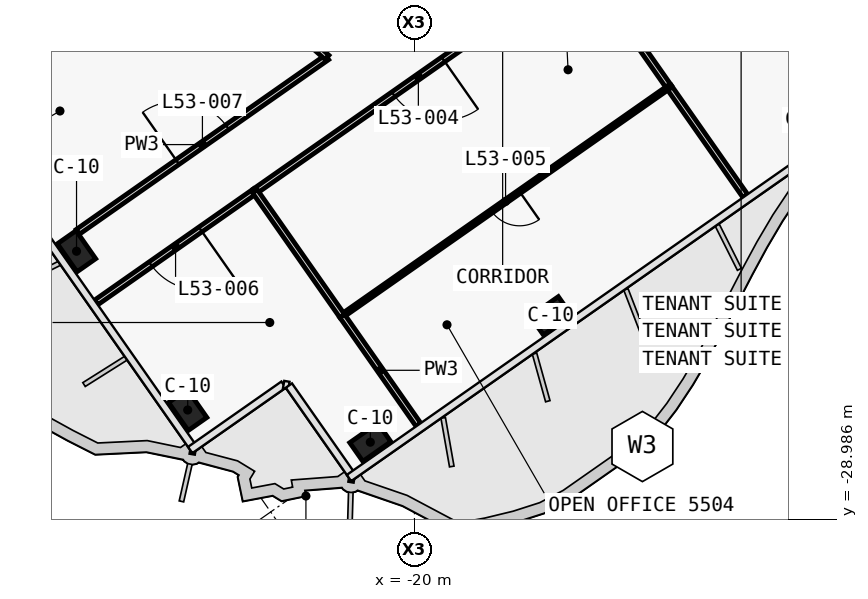
"""IFC4 building model, lengths in metres.
Left out: names, types, materials, properties, quantities, classifications, styles, units other than length and angle.
Written with IfcOpenShell. Run it as: python <this file> out.ifc"""

import sys

from ifc_helpers import new_model, si_unit, direction, frame, frame_2d, origin, origin_2d, place, context, subcontext, project, spatial, rectangle, extrude, element, fill, save


model = new_model("IFC4")
c1 = context("Model", 3, precision=1e-05, world=origin(), true_north=direction((0.0, 1.0)))
c2 = subcontext(c1, "Body", "Model", "MODEL_VIEW")
j1 = project(units=[si_unit("LENGTHUNIT", "METRE"), si_unit("PLANEANGLEUNIT", "RADIAN")], contexts=[c1])
p1 = place(None, origin())
s1 = spatial("IfcSite", under=j1, at=p1, CompositionType="ELEMENT")
p2 = place(p1, origin())
s2 = spatial("IfcBuilding", under=s1, at=p2, CompositionType="ELEMENT")
p3 = place(p2, frame((0.0, 0.0, 229.3)))
s3 = spatial("IfcBuildingStorey", under=s2, at=p3, CompositionType="ELEMENT", Elevation=229.3)
for number, where, z_axis, x_axis in (
    (1, (-16.41, -23.637, 0.0), (0.0, 0.0, 1.0), (-0.819, -0.574, 0.0)),
    (2, (-21.161, -26.964, 0.0), (0.0, 0.0, 1.0), (-0.819, -0.574, 0.0)),
    (3, (-25.966, -26.117, 0.0), (0.0, 0.0, 1.0), (-0.574, 0.819, 0.0)),
    (4, (-28.891, -21.939, 0.0), (0.0, 0.0, 1.0), (-0.574, 0.819, 0.0)),
):
    element("IfcColumn", number, at=place(p3, frame(where, z_axis=z_axis, x_axis=x_axis)), inside=s3, PredefinedType="COLUMN", context=c2, shape_type="SweptSolid", body=[
        extrude(rectangle(XDim=0.9, YDim=0.6, at=origin_2d()), origin(), (0.0, 0.0, 1.0), 3.9),
    ])
p4 = place(p3, frame((-28.858, -21.428, 0.0), z_axis=(0.0, 0.0, 1.0), x_axis=(0.819138799838, 0.573595350923, 0.0)))
e5 = element("IfcWall", 5, at=p4, inside=s3, PredefinedType="PARTITIONING", context=c2, shape_type="SweptSolid", body=[
    extrude(rectangle(XDim=8.007, YDim=0.15, at=frame_2d((4.003, 0.0))), origin(), (0.0, 0.0, 1.0), 3.05),
])
p5 = place(p4, frame((3.204, 0.0, 0.0)))
e6 = element("IfcOpeningElement", 6, at=p5, cuts=e5, PredefinedType="OPENING", context=c2, shape_type="SweptSolid", body=[
    extrude(rectangle(XDim=1.6, YDim=2.1, at=frame_2d((0.8, 1.05))), frame((0.0, 0.085, 0.0), z_axis=(0.0, -1.0, 0.0), x_axis=(1.0, 0.0, 0.0)), (0.0, 0.0, 1.0), 0.17),
])
p6 = place(p3, frame((-15.594, -14.338, 0.0), z_axis=(0.0, 0.0, 1.0), x_axis=(-0.819164214721, -0.57355905478, 0.0)))
e7 = element("IfcWall", 7, at=p6, inside=s3, PredefinedType="PARTITIONING", context=c2, shape_type="SweptSolid", body=[
    extrude(rectangle(XDim=10.504, YDim=0.15, at=frame_2d((5.252, 0.0))), origin(), (0.0, 0.0, 1.0), 3.05),
])
p7 = place(p6, frame((4.452, 0.0, 0.0)))
e8 = element("IfcOpeningElement", 8, at=p7, cuts=e7, PredefinedType="OPENING", context=c2, shape_type="SweptSolid", body=[
    extrude(rectangle(XDim=1.6, YDim=2.1, at=frame_2d((0.8, 1.05))), frame((0.0, 0.085, 0.0), z_axis=(0.0, -1.0, 0.0), x_axis=(1.0, 0.0, 0.0)), (0.0, 0.0, 1.0), 0.17),
])
p8 = place(p3, frame((-24.196, -20.36, 0.0), z_axis=(0.0, 0.0, 1.0), x_axis=(-0.819132992492, -0.573603644176, 0.0)))
e9 = element("IfcWall", 9, at=p8, inside=s3, PredefinedType="PARTITIONING", context=c2, shape_type="SweptSolid", body=[
    extrude(rectangle(XDim=5.102, YDim=0.15, at=frame_2d((2.551, 0.0))), origin(), (0.0, 0.0, 1.0), 3.0),
])
p9 = place(p8, frame((1.751, 0.0, 0.0)))
e10 = element("IfcOpeningElement", 10, at=p9, cuts=e9, PredefinedType="OPENING", context=c2, shape_type="SweptSolid", body=[
    extrude(rectangle(XDim=1.6, YDim=2.1, at=frame_2d((0.8, 1.05))), frame((0.0, 0.085, 0.0), z_axis=(0.0, -1.0, 0.0), x_axis=(1.0, 0.0, 0.0)), (0.0, 0.0, 1.0), 0.17),
])
p10 = place(p3, frame((-22.3, -16.837, 0.0), z_axis=(0.0, 0.0, 1.0), x_axis=(-0.746942190663, 0.664888986078, 0.0)))
e11 = element("IfcWall", 11, at=p10, inside=s3, PredefinedType="PARTITIONING", context=c2, shape_type="SweptSolid", body=[
    extrude(rectangle(XDim=2.365, YDim=0.15, at=frame_2d((1.183, 0.0))), origin(), (0.0, 0.0, 1.0), 3.62),
])
p11 = place(p3, frame((-31.727, -17.331, 0.0), z_axis=(0.0, 0.0, 1.0), x_axis=(0.819140241507, 0.573593292101, 0.0)))
e12 = element("IfcWall", 12, at=p11, inside=s3, PredefinedType="PARTITIONING", context=c2, shape_type="SweptSolid", body=[
    extrude(rectangle(XDim=7.132, YDim=0.1, at=frame_2d((3.566, 0.0))), origin(), (0.0, 0.0, 1.0), 3.0),
])
p12 = place(p11, frame((3.116, 0.0, 0.0)))
e13 = element("IfcOpeningElement", 13, at=p12, cuts=e12, PredefinedType="OPENING", context=c2, shape_type="SweptSolid", body=[
    extrude(rectangle(XDim=0.9, YDim=2.1, at=frame_2d((0.45, 1.05))), frame((0.0, 0.06, 0.0), z_axis=(0.0, -1.0, 0.0), x_axis=(1.0, 0.0, 0.0)), (0.0, 0.0, 1.0), 0.12),
])
p13 = place(p3, frame((-7.608, -17.901, 0.0), z_axis=(0.0, 0.0, 1.0), x_axis=(-0.573560650686, 0.819163097304, 0.0)))
e14 = element("IfcWall", 14, at=p13, inside=s3, PredefinedType="PARTITIONING", context=c2, shape_type="SweptSolid", body=[
    extrude(rectangle(XDim=7.5, YDim=0.15, at=frame_2d((3.75, 0.0))), origin(), (0.0, 0.0, 1.0), 3.0),
])
p14 = place(p3, frame((-11.294, -20.482, 0.0), z_axis=(0.0, 0.0, 1.0), x_axis=(-0.573560622794, 0.819163116834, 0.0)))
e15 = element("IfcWall", 15, at=p14, inside=s3, PredefinedType="PARTITIONING", context=c2, shape_type="SweptSolid", body=[
    extrude(rectangle(XDim=3.501, YDim=0.15, at=frame_2d((1.75, 0.0))), origin(), (0.0, 0.0, 1.0), 3.0),
])
p15 = place(p3, frame((-13.301, -17.617, 0.0), z_axis=(0.0, 0.0, 1.0), x_axis=(-0.573560601885, 0.819163131473, 0.0)))
e16 = element("IfcWall", 16, at=p15, inside=s3, PredefinedType="PARTITIONING", context=c2, shape_type="SweptSolid", body=[
    extrude(rectangle(XDim=4.002, YDim=0.15, at=frame_2d((2.001, 0.0))), origin(), (0.0, 0.0, 1.0), 3.62),
])
p16 = place(p3, frame((-13.301, -17.616, 0.0), z_axis=(0.0, 0.0, 1.0), x_axis=(-0.819155448096, -0.573571575181, 0.0)))
e17 = element("IfcWall", 17, at=p16, inside=s3, PredefinedType="PARTITIONING", context=c2, shape_type="SweptSolid", body=[
    extrude(rectangle(XDim=10.5, YDim=0.1, at=frame_2d((5.25, 0.0))), origin(), (0.0, 0.0, 1.0), 3.05),
])
p17 = place(p16, frame((4.8, 0.0, 0.0)))
e18 = element("IfcOpeningElement", 18, at=p17, cuts=e17, PredefinedType="OPENING", context=c2, shape_type="SweptSolid", body=[
    extrude(rectangle(XDim=0.9, YDim=2.1, at=frame_2d((0.45, 1.05))), frame((0.0, 0.06, 0.0), z_axis=(0.0, -1.0, 0.0), x_axis=(1.0, 0.0, 0.0)), (0.0, 0.0, 1.0), 0.12),
])
p18 = place(p3, frame((-19.896, -26.505, 0.0), z_axis=(0.0, 0.0, 1.0), x_axis=(-0.573555999232, 0.819166354134, 0.0)))
e19 = element("IfcWall", 19, at=p18, inside=s3, PredefinedType="PARTITIONING", context=c2, shape_type="SweptSolid", body=[
    extrude(rectangle(XDim=3.499, YDim=0.15, at=frame_2d((1.75, 0.0))), origin(), (0.0, 0.0, 1.0), 3.0),
])
p19 = place(p3, frame((-21.903, -23.638, 0.0), z_axis=(0.0, 0.0, 1.0), x_axis=(-0.573556557423, 0.819165963305, 0.0)))
e20 = element("IfcWall", 20, at=p19, inside=s3, PredefinedType="PARTITIONING", context=c2, shape_type="SweptSolid", body=[
    extrude(rectangle(XDim=4.0, YDim=0.15, at=frame_2d((2.0, 0.0))), origin(), (0.0, 0.0, 1.0), 3.62),
])
p20 = place(p7, origin())
e21 = element("IfcDoor", 21, at=p20, inside=s3, OperationType="DOUBLE_DOOR_SINGLE_SWING", PredefinedType="DOOR", context=c2, shape_type="SweptSolid", body=[
    extrude(rectangle(XDim=1.6, YDim=2.1, at=frame_2d((0.8, 1.05))), frame((0.0, 0.025, 0.0), z_axis=(0.0, -1.0, 0.0), x_axis=(1.0, 0.0, 0.0)), (0.0, 0.0, 1.0), 0.05),
])
fill(e8, e21)
p21 = place(p17, origin())
e22 = element("IfcDoor", 22, at=p21, inside=s3, OperationType="SINGLE_SWING_LEFT", PredefinedType="DOOR", context=c2, shape_type="SweptSolid", body=[
    extrude(rectangle(XDim=0.9, YDim=2.1, at=frame_2d((0.45, 1.05))), frame((0.0, 0.025, 0.0), z_axis=(0.0, -1.0, 0.0), x_axis=(1.0, 0.0, 0.0)), (0.0, 0.0, 1.0), 0.05),
])
fill(e18, e22)
p22 = place(p9, origin())
e23 = element("IfcDoor", 23, at=p22, inside=s3, OperationType="DOUBLE_DOOR_SINGLE_SWING", PredefinedType="DOOR", context=c2, shape_type="SweptSolid", body=[
    extrude(rectangle(XDim=1.6, YDim=2.1, at=frame_2d((0.8, 1.05))), frame((0.0, 0.025, 0.0), z_axis=(0.0, -1.0, 0.0), x_axis=(1.0, 0.0, 0.0)), (0.0, 0.0, 1.0), 0.05),
])
fill(e10, e23)
p23 = place(p5, origin())
e24 = element("IfcDoor", 24, at=p23, inside=s3, OperationType="DOUBLE_DOOR_SINGLE_SWING", PredefinedType="DOOR", context=c2, shape_type="SweptSolid", body=[
    extrude(rectangle(XDim=1.6, YDim=2.1, at=frame_2d((0.8, 1.05))), frame((0.0, 0.025, 0.0), z_axis=(0.0, -1.0, 0.0), x_axis=(1.0, 0.0, 0.0)), (0.0, 0.0, 1.0), 0.05),
])
fill(e6, e24)
save(model, sys.argv[1])
